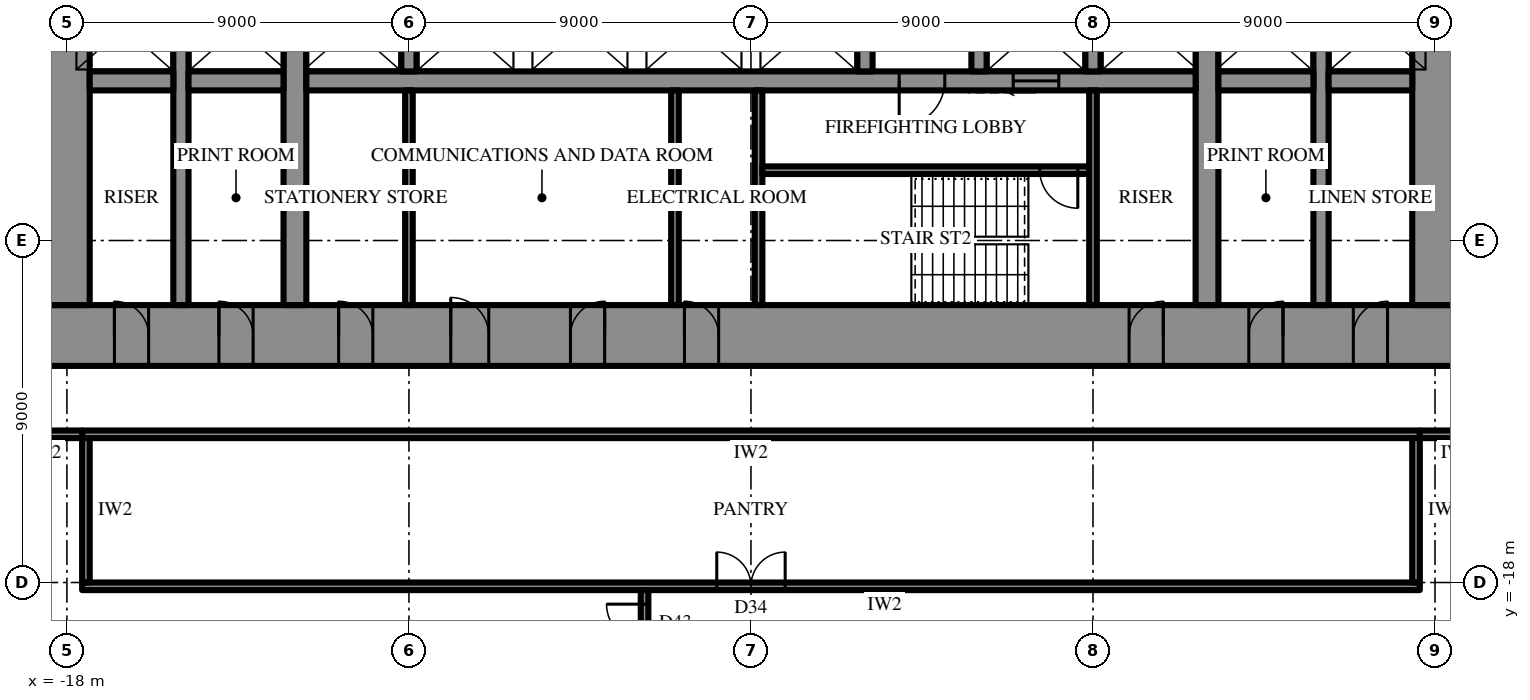
"""IFC4 building model, lengths in metres.
Left out: names, types, materials, properties, quantities, classifications, styles, units other than length and angle.
Written with IfcOpenShell. Run it as: python <this file> out.ifc"""

import sys

from ifc_helpers import new_model, si_unit, direction, frame, frame_2d, origin, place, context, subcontext, project, spatial, rectangle, extrude, element, fill, save


model = new_model("IFC4")
c1 = context("Model", 3, precision=1e-05, world=origin(), true_north=direction((0.0, 1.0)))
c2 = subcontext(c1, "Body", "Model", "MODEL_VIEW")
j1 = project(units=[si_unit("LENGTHUNIT", "METRE"), si_unit("PLANEANGLEUNIT", "RADIAN")], contexts=[c1])
p1 = place(None, origin())
s1 = spatial("IfcSite", under=j1, at=p1, CompositionType="ELEMENT")
p2 = place(p1, origin())
s2 = spatial("IfcBuilding", under=s1, at=p2, CompositionType="ELEMENT")
p3 = place(p2, frame((0.0, 0.0, 99.1)))
s3 = spatial("IfcBuildingStorey", under=s2, at=p3, CompositionType="ELEMENT", Elevation=99.1)
p4 = place(p3, frame((18.6, -11.5, 0.0), z_axis=(0.0, 0.0, 1.0), x_axis=(-1.0, 0.0, 0.0)))
e1 = element("IfcWall", 1, at=p4, inside=s3, PredefinedType="SHEAR", context=c2, shape_type="SweptSolid", body=[
    extrude(rectangle(XDim=37.2, YDim=1.6, at=frame_2d((18.6, 0.0))), origin(), (0.0, 0.0, 1.0), 4.2),
])
p5 = place(p4, frame((19.45, 0.0, 0.0)))
e2 = element("IfcOpeningElement", 2, at=p5, cuts=e1, PredefinedType="OPENING", context=c2, shape_type="SweptSolid", body=[
    extrude(rectangle(XDim=0.9, YDim=2.2, at=frame_2d((0.45, 1.1))), frame((0.0, 0.81, 0.0), z_axis=(0.0, -1.0, 0.0), x_axis=(1.0, 0.0, 0.0)), (0.0, 0.0, 1.0), 1.62),
])
p6 = place(p4, frame((22.45, 0.0, 0.0)))
e3 = element("IfcOpeningElement", 3, at=p6, cuts=e1, PredefinedType="OPENING", context=c2, shape_type="SweptSolid", body=[
    extrude(rectangle(XDim=0.9, YDim=2.2, at=frame_2d((0.45, 1.1))), frame((0.0, 0.81, 0.0), z_axis=(0.0, -1.0, 0.0), x_axis=(1.0, 0.0, 0.0)), (0.0, 0.0, 1.0), 1.62),
])
p7 = place(p4, frame((25.5, 0.0, 0.0)))
e4 = element("IfcOpeningElement", 4, at=p7, cuts=e1, PredefinedType="OPENING", context=c2, shape_type="SweptSolid", body=[
    extrude(rectangle(XDim=1.0, YDim=2.2, at=frame_2d((0.5, 1.1))), frame((0.0, 0.81, 0.0), z_axis=(0.0, -1.0, 0.0), x_axis=(1.0, 0.0, 0.0)), (0.0, 0.0, 1.0), 1.62),
])
p8 = place(p4, frame((1.85, 0.0, 0.0)))
e5 = element("IfcOpeningElement", 5, at=p8, cuts=e1, PredefinedType="OPENING", context=c2, shape_type="SweptSolid", body=[
    extrude(rectangle(XDim=0.9, YDim=2.2, at=frame_2d((0.45, 1.1))), frame((0.0, 0.81, 0.0), z_axis=(0.0, -1.0, 0.0), x_axis=(1.0, 0.0, 0.0)), (0.0, 0.0, 1.0), 1.62),
])
p9 = place(p4, frame((4.6, 0.0, 0.0)))
e6 = element("IfcOpeningElement", 6, at=p9, cuts=e1, PredefinedType="OPENING", context=c2, shape_type="SweptSolid", body=[
    extrude(rectangle(XDim=0.9, YDim=2.2, at=frame_2d((0.45, 1.1))), frame((0.0, 0.81, 0.0), z_axis=(0.0, -1.0, 0.0), x_axis=(1.0, 0.0, 0.0)), (0.0, 0.0, 1.0), 1.62),
])
p10 = place(p4, frame((7.75, 0.0, 0.0)))
e7 = element("IfcOpeningElement", 7, at=p10, cuts=e1, PredefinedType="OPENING", context=c2, shape_type="SweptSolid", body=[
    extrude(rectangle(XDim=0.9, YDim=2.2, at=frame_2d((0.45, 1.1))), frame((0.0, 0.81, 0.0), z_axis=(0.0, -1.0, 0.0), x_axis=(1.0, 0.0, 0.0)), (0.0, 0.0, 1.0), 1.62),
])
p11 = place(p4, frame((28.55, 0.0, 0.0)))
e8 = element("IfcOpeningElement", 8, at=p11, cuts=e1, PredefinedType="OPENING", context=c2, shape_type="SweptSolid", body=[
    extrude(rectangle(XDim=0.9, YDim=2.2, at=frame_2d((0.45, 1.1))), frame((0.0, 0.81, 0.0), z_axis=(0.0, -1.0, 0.0), x_axis=(1.0, 0.0, 0.0)), (0.0, 0.0, 1.0), 1.62),
])
p12 = place(p4, frame((31.7, 0.0, 0.0)))
e9 = element("IfcOpeningElement", 9, at=p12, cuts=e1, PredefinedType="OPENING", context=c2, shape_type="SweptSolid", body=[
    extrude(rectangle(XDim=0.9, YDim=2.2, at=frame_2d((0.45, 1.1))), frame((0.0, 0.81, 0.0), z_axis=(0.0, -1.0, 0.0), x_axis=(1.0, 0.0, 0.0)), (0.0, 0.0, 1.0), 1.62),
])
p13 = place(p4, frame((34.45, 0.0, 0.0)))
e10 = element("IfcOpeningElement", 10, at=p13, cuts=e1, PredefinedType="OPENING", context=c2, shape_type="SweptSolid", body=[
    extrude(rectangle(XDim=0.9, YDim=2.2, at=frame_2d((0.45, 1.1))), frame((0.0, 0.81, 0.0), z_axis=(0.0, -1.0, 0.0), x_axis=(1.0, 0.0, 0.0)), (0.0, 0.0, 1.0), 1.62),
])
p14 = place(p3, frame((18.0, -10.7, 0.0), z_axis=(0.0, 0.0, 1.0), x_axis=(0.0, 1.0, 0.0)))
e11 = element("IfcWall", 11, at=p14, inside=s3, PredefinedType="SHEAR", context=c2, shape_type="SweptSolid", body=[
    extrude(rectangle(XDim=21.4, YDim=1.2, at=frame_2d((10.7, 0.0))), origin(), (0.0, 0.0, 1.0), 4.2),
])
p15 = place(p14, frame((9.8, 0.0, 0.0)))
e12 = element("IfcOpeningElement", 12, at=p15, cuts=e11, PredefinedType="OPENING", context=c2, shape_type="SweptSolid", body=[
    extrude(rectangle(XDim=1.8, YDim=2.4, at=frame_2d((0.9, 1.2))), frame((0.0, 0.61, 0.0), z_axis=(0.0, -1.0, 0.0), x_axis=(1.0, 0.0, 0.0)), (0.0, 0.0, 1.0), 1.22),
])
p16 = place(p3, frame((-18.0, 10.7, 0.0), z_axis=(0.0, 0.0, 1.0), x_axis=(0.0, -1.0, 0.0)))
e13 = element("IfcWall", 13, at=p16, inside=s3, PredefinedType="SHEAR", context=c2, shape_type="SweptSolid", body=[
    extrude(rectangle(XDim=21.4, YDim=1.2, at=frame_2d((10.7, 0.0))), origin(), (0.0, 0.0, 1.0), 4.2),
])
p17 = place(p16, frame((9.8, 0.0, 0.0)))
e14 = element("IfcOpeningElement", 14, at=p17, cuts=e13, PredefinedType="OPENING", context=c2, shape_type="SweptSolid", body=[
    extrude(rectangle(XDim=1.8, YDim=2.4, at=frame_2d((0.9, 1.2))), frame((0.0, 0.61, 0.0), z_axis=(0.0, -1.0, 0.0), x_axis=(1.0, 0.0, 0.0)), (0.0, 0.0, 1.0), 1.22),
])
p18 = place(p3, frame((12.0, -10.7, 0.0), z_axis=(0.0, 0.0, 1.0), x_axis=(0.0, 1.0, 0.0)))
e15 = element("IfcWall", 15, at=p18, inside=s3, PredefinedType="SHEAR", context=c2, shape_type="SweptSolid", body=[
    extrude(rectangle(XDim=21.4, YDim=0.6, at=frame_2d((10.7, 0.0))), origin(), (0.0, 0.0, 1.0), 4.2),
])
p19 = place(p18, frame((9.8, 0.0, 0.0)))
e16 = element("IfcOpeningElement", 16, at=p19, cuts=e15, PredefinedType="OPENING", context=c2, shape_type="SweptSolid", body=[
    extrude(rectangle(XDim=1.8, YDim=2.4, at=frame_2d((0.9, 1.2))), frame((0.0, 0.31, 0.0), z_axis=(0.0, -1.0, 0.0), x_axis=(1.0, 0.0, 0.0)), (0.0, 0.0, 1.0), 0.62),
])
p20 = place(p3, frame((-12.0, -10.7, 0.0), z_axis=(0.0, 0.0, 1.0), x_axis=(0.0, 1.0, 0.0)))
e17 = element("IfcWall", 17, at=p20, inside=s3, PredefinedType="SHEAR", context=c2, shape_type="SweptSolid", body=[
    extrude(rectangle(XDim=21.4, YDim=0.6, at=frame_2d((10.7, 0.0))), origin(), (0.0, 0.0, 1.0), 4.2),
])
p21 = place(p20, frame((9.8, 0.0, 0.0)))
e18 = element("IfcOpeningElement", 18, at=p21, cuts=e17, PredefinedType="OPENING", context=c2, shape_type="SweptSolid", body=[
    extrude(rectangle(XDim=1.8, YDim=2.4, at=frame_2d((0.9, 1.2))), frame((0.0, 0.31, 0.0), z_axis=(0.0, -1.0, 0.0), x_axis=(1.0, 0.0, 0.0)), (0.0, 0.0, 1.0), 0.62),
])
p22 = place(p3, frame((15.0, -10.7, 0.0), z_axis=(0.0, 0.0, 1.0), x_axis=(0.0, 1.0, 0.0)))
e19 = element("IfcWall", 19, at=p22, inside=s3, PredefinedType="SHEAR", context=c2, shape_type="SweptSolid", body=[
    extrude(rectangle(XDim=21.4, YDim=0.4, at=frame_2d((10.7, 0.0))), origin(), (0.0, 0.0, 1.0), 4.2),
])
p23 = place(p22, frame((9.8, 0.0, 0.0)))
e20 = element("IfcOpeningElement", 20, at=p23, cuts=e19, PredefinedType="OPENING", context=c2, shape_type="SweptSolid", body=[
    extrude(rectangle(XDim=1.8, YDim=2.4, at=frame_2d((0.9, 1.2))), frame((0.0, 0.21, 0.0), z_axis=(0.0, -1.0, 0.0), x_axis=(1.0, 0.0, 0.0)), (0.0, 0.0, 1.0), 0.42),
])
p24 = place(p3, frame((-15.0, -10.7, 0.0), z_axis=(0.0, 0.0, 1.0), x_axis=(0.0, 1.0, 0.0)))
e21 = element("IfcWall", 21, at=p24, inside=s3, PredefinedType="SHEAR", context=c2, shape_type="SweptSolid", body=[
    extrude(rectangle(XDim=21.4, YDim=0.4, at=frame_2d((10.7, 0.0))), origin(), (0.0, 0.0, 1.0), 4.2),
])
p25 = place(p24, frame((9.8, 0.0, 0.0)))
e22 = element("IfcOpeningElement", 22, at=p25, cuts=e21, PredefinedType="OPENING", context=c2, shape_type="SweptSolid", body=[
    extrude(rectangle(XDim=1.8, YDim=2.4, at=frame_2d((0.9, 1.2))), frame((0.0, 0.21, 0.0), z_axis=(0.0, -1.0, 0.0), x_axis=(1.0, 0.0, 0.0)), (0.0, 0.0, 1.0), 0.42),
])
p26 = place(p3, frame((17.4, -4.8, 0.0), z_axis=(0.0, 0.0, 1.0), x_axis=(-1.0, 0.0, 0.0)))
e23 = element("IfcWall", 23, at=p26, inside=s3, PredefinedType="SHEAR", context=c2, shape_type="SweptSolid", body=[
    extrude(rectangle(XDim=2.2, YDim=0.5, at=frame_2d((1.1, 0.0))), origin(), (0.0, 0.0, 1.0), 4.2),
])
p27 = place(p3, frame((14.8, -4.8, 0.0), z_axis=(0.0, 0.0, 1.0), x_axis=(-1.0, 0.0, 0.0)))
e24 = element("IfcWall", 24, at=p27, inside=s3, PredefinedType="SHEAR", context=c2, shape_type="SweptSolid", body=[
    extrude(rectangle(XDim=2.5, YDim=0.5, at=frame_2d((1.25, 0.0))), origin(), (0.0, 0.0, 1.0), 4.2),
])
p28 = place(p3, frame((11.7, -4.8, 0.0), z_axis=(0.0, 0.0, 1.0), x_axis=(-1.0, 0.0, 0.0)))
e25 = element("IfcWall", 25, at=p28, inside=s3, PredefinedType="SHEAR", context=c2, shape_type="SweptSolid", body=[
    extrude(rectangle(XDim=23.4, YDim=0.5, at=frame_2d((11.7, 0.0))), origin(), (0.0, 0.0, 1.0), 4.2),
])
p29 = place(p28, frame((6.6, 0.0, 0.0)))
e26 = element("IfcOpeningElement", 26, at=p29, cuts=e25, PredefinedType="OPENING", context=c2, shape_type="SweptSolid", body=[
    extrude(rectangle(XDim=1.2, YDim=2.2, at=frame_2d((0.6, 1.1))), frame((0.0, 0.26, 0.0), z_axis=(0.0, -1.0, 0.0), x_axis=(1.0, 0.0, 0.0)), (0.0, 0.0, 1.0), 0.52),
])
p30 = place(p28, frame((3.6, 0.0, 0.0)))
e27 = element("IfcOpeningElement", 27, at=p30, cuts=e25, PredefinedType="OPENING", context=c2, shape_type="SweptSolid", body=[
    extrude(rectangle(XDim=1.2, YDim=2.2, at=frame_2d((0.6, 1.1))), frame((0.0, 0.26, 0.0), z_axis=(0.0, -1.0, 0.0), x_axis=(1.0, 0.0, 0.0)), (0.0, 0.0, 1.0), 0.52),
])
p31 = place(p3, frame((-12.3, -4.8, 0.0), z_axis=(0.0, 0.0, 1.0), x_axis=(-1.0, 0.0, 0.0)))
e28 = element("IfcWall", 28, at=p31, inside=s3, PredefinedType="SHEAR", context=c2, shape_type="SweptSolid", body=[
    extrude(rectangle(XDim=2.5, YDim=0.5, at=frame_2d((1.25, 0.0))), origin(), (0.0, 0.0, 1.0), 4.2),
])
p32 = place(p3, frame((-15.2, -4.8, 0.0), z_axis=(0.0, 0.0, 1.0), x_axis=(-1.0, 0.0, 0.0)))
e29 = element("IfcWall", 29, at=p32, inside=s3, PredefinedType="SHEAR", context=c2, shape_type="SweptSolid", body=[
    extrude(rectangle(XDim=2.2, YDim=0.5, at=frame_2d((1.1, 0.0))), origin(), (0.0, 0.0, 1.0), 4.2),
])
for number, where, z_axis, x_axis in (
    (30, (9.0, -2.25, 0.0), (0.0, 0.0, 1.0), (0.0, -1.0, 0.0)),
    (31, (6.0, -2.25, 0.0), (0.0, 0.0, 1.0), (0.0, -1.0, 0.0)),
    (32, (3.0, -2.25, 0.0), (0.0, 0.0, 1.0), (0.0, -1.0, 0.0)),
    (33, (-9.0, -2.25, 0.0), (0.0, 0.0, 1.0), (0.0, -1.0, 0.0)),
):
    element("IfcWall", number, at=place(p3, frame(where, z_axis=z_axis, x_axis=x_axis)), inside=s3, PredefinedType="SHEAR", context=c2, shape_type="SweptSolid", body=[
        extrude(rectangle(XDim=2.3, YDim=0.4, at=frame_2d((1.15, 0.0))), origin(), (0.0, 0.0, 1.0), 4.2),
    ])
p33 = place(p3, frame((0.2, -5.05, 0.0), z_axis=(0.0, 0.0, 1.0), x_axis=(0.0, -1.0, 0.0)))
e34 = element("IfcWall", 34, at=p33, inside=s3, PredefinedType="SHEAR", context=c2, shape_type="SweptSolid", body=[
    extrude(rectangle(XDim=5.65, YDim=0.2, at=frame_2d((2.825, 0.0))), origin(), (0.0, 0.0, 1.0), 4.2),
])
p34 = place(p3, frame((8.9, -7.15, 0.0), z_axis=(0.0, 0.0, 1.0), x_axis=(-1.0, 0.0, 0.0)))
e35 = element("IfcWall", 35, at=p34, inside=s3, PredefinedType="SHEAR", context=c2, shape_type="SweptSolid", body=[
    extrude(rectangle(XDim=8.6, YDim=0.2, at=frame_2d((4.3, 0.0))), origin(), (0.0, 0.0, 1.0), 4.2),
])
p35 = place(p34, frame((0.3, 0.0, 0.0)))
e36 = element("IfcOpeningElement", 36, at=p35, cuts=e35, PredefinedType="OPENING", context=c2, shape_type="SweptSolid", body=[
    extrude(rectangle(XDim=1.0, YDim=2.2, at=frame_2d((0.5, 1.1))), frame((0.0, 0.11, 0.0), z_axis=(0.0, -1.0, 0.0), x_axis=(1.0, 0.0, 0.0)), (0.0, 0.0, 1.0), 0.22),
])
for number, where, z_axis, x_axis in (
    (37, (9.0, -5.05, 0.0), (0.0, 0.0, 1.0), (0.0, -1.0, 0.0)),
    (38, (-9.0, -5.05, 0.0), (0.0, 0.0, 1.0), (0.0, -1.0, 0.0)),
    (39, (-2.0, -5.05, 0.0), (0.0, 0.0, 1.0), (0.0, -1.0, 0.0)),
):
    element("IfcWall", number, at=place(p3, frame(where, z_axis=z_axis, x_axis=x_axis)), inside=s3, PredefinedType="PARTITIONING", context=c2, shape_type="SweptSolid", body=[
        extrude(rectangle(XDim=5.65, YDim=0.2, at=frame_2d((2.825, 0.0))), origin(), (0.0, 0.0, 1.0), 4.0),
    ])
p36 = place(p3, frame((17.6, -14.1, 0.0), z_axis=(0.0, 0.0, 1.0), x_axis=(-1.0, 0.0, 0.0)))
e40 = element("IfcWall", 40, at=p36, inside=s3, PredefinedType="PARTITIONING", context=c2, shape_type="SweptSolid", body=[
    extrude(rectangle(XDim=35.2, YDim=0.2, at=frame_2d((17.6, 0.0))), origin(), (0.0, 0.0, 1.0), 4.0),
])
p37 = place(p3, frame((17.6, -18.1, 0.0), z_axis=(0.0, 0.0, 1.0), x_axis=(-1.0, 0.0, 0.0)))
e41 = element("IfcWall", 41, at=p37, inside=s3, PredefinedType="PARTITIONING", context=c2, shape_type="SweptSolid", body=[
    extrude(rectangle(XDim=35.2, YDim=0.2, at=frame_2d((17.6, 0.0))), origin(), (0.0, 0.0, 1.0), 4.0),
])
p38 = place(p37, frame((16.7, 0.0, 0.0)))
e42 = element("IfcOpeningElement", 42, at=p38, cuts=e41, PredefinedType="OPENING", context=c2, shape_type="SweptSolid", body=[
    extrude(rectangle(XDim=1.8, YDim=2.4, at=frame_2d((0.9, 1.2))), frame((0.0, 0.11, 0.0), z_axis=(0.0, -1.0, 0.0), x_axis=(1.0, 0.0, 0.0)), (0.0, 0.0, 1.0), 0.22),
])
for number, where, z_axis, x_axis in (
    (43, (17.5, -14.2, 0.0), (0.0, 0.0, 1.0), (0.0, -1.0, 0.0)),
    (44, (-17.5, -14.2, 0.0), (0.0, 0.0, 1.0), (0.0, -1.0, 0.0)),
):
    element("IfcWall", number, at=place(p3, frame(where, z_axis=z_axis, x_axis=x_axis)), inside=s3, PredefinedType="PARTITIONING", context=c2, shape_type="SweptSolid", body=[
        extrude(rectangle(XDim=3.8, YDim=0.2, at=frame_2d((1.9, 0.0))), origin(), (0.0, 0.0, 1.0), 4.0),
    ])
for number, where, z_axis, x_axis in (
    (45, (-17.6, -14.1, 0.0), (0.0, 0.0, 1.0), (-1.0, 0.0, 0.0)),
    (46, (19.6, -14.1, 0.0), (0.0, 0.0, 1.0), (-1.0, 0.0, 0.0)),
):
    element("IfcWall", number, at=place(p3, frame(where, z_axis=z_axis, x_axis=x_axis)), inside=s3, PredefinedType="PARTITIONING", context=c2, shape_type="SweptSolid", body=[
        extrude(rectangle(XDim=2.0, YDim=0.2, at=frame_2d((1.0, 0.0))), origin(), (0.0, 0.0, 1.0), 4.0),
    ])
p39 = place(p3, frame((-2.8, -18.2, 0.0), z_axis=(0.0, 0.0, 1.0), x_axis=(0.0, -1.0, 0.0)))
e47 = element("IfcWall", 47, at=p39, inside=s3, PredefinedType="PARTITIONING", context=c2, shape_type="SweptSolid", body=[
    extrude(rectangle(XDim=8.7, YDim=0.2, at=frame_2d((4.35, 0.0))), origin(), (0.0, 0.0, 1.0), 2.944),
])
p40 = place(p39, frame((0.37, 0.0, 0.0)))
e48 = element("IfcOpeningElement", 48, at=p40, cuts=e47, PredefinedType="OPENING", context=c2, shape_type="SweptSolid", body=[
    extrude(rectangle(XDim=1.0, YDim=2.2, at=frame_2d((0.5, 1.1))), frame((0.0, 0.11, 0.0), z_axis=(0.0, -1.0, 0.0), x_axis=(1.0, 0.0, 0.0)), (0.0, 0.0, 1.0), 0.22),
])
p41 = place(p29, origin())
e49 = element("IfcDoor", 49, at=p41, inside=s3, OperationType="SINGLE_SWING_LEFT", PredefinedType="DOOR", context=c2, shape_type="SweptSolid", body=[
    extrude(rectangle(XDim=1.2, YDim=2.2, at=frame_2d((0.6, 1.1))), frame((0.0, 0.025, 0.0), z_axis=(0.0, -1.0, 0.0), x_axis=(1.0, 0.0, 0.0)), (0.0, 0.0, 1.0), 0.05),
])
fill(e26, e49)
p42 = place(p35, origin())
e50 = element("IfcDoor", 50, at=p42, inside=s3, OperationType="SINGLE_SWING_RIGHT", PredefinedType="DOOR", context=c2, shape_type="SweptSolid", body=[
    extrude(rectangle(XDim=1.0, YDim=2.2, at=frame_2d((0.5, 1.1))), frame((0.0, 0.025, 0.0), z_axis=(0.0, -1.0, 0.0), x_axis=(1.0, 0.0, 0.0)), (0.0, 0.0, 1.0), 0.05),
])
fill(e36, e50)
p43 = place(p5, frame((0.9, 0.0, 0.0), z_axis=(0.0, 0.0, 1.0), x_axis=(-1.0, 0.0, 0.0)))
e51 = element("IfcDoor", 51, at=p43, inside=s3, OperationType="SINGLE_SWING_RIGHT", PredefinedType="DOOR", context=c2, shape_type="SweptSolid", body=[
    extrude(rectangle(XDim=0.9, YDim=2.2, at=frame_2d((0.45, 1.1))), frame((0.0, 0.025, 0.0), z_axis=(0.0, -1.0, 0.0), x_axis=(1.0, 0.0, 0.0)), (0.0, 0.0, 1.0), 0.05),
])
fill(e2, e51)
p44 = place(p6, frame((0.9, 0.0, 0.0), z_axis=(0.0, 0.0, 1.0), x_axis=(-1.0, 0.0, 0.0)))
e52 = element("IfcDoor", 52, at=p44, inside=s3, OperationType="SINGLE_SWING_LEFT", PredefinedType="DOOR", context=c2, shape_type="SweptSolid", body=[
    extrude(rectangle(XDim=0.9, YDim=2.2, at=frame_2d((0.45, 1.1))), frame((0.0, 0.025, 0.0), z_axis=(0.0, -1.0, 0.0), x_axis=(1.0, 0.0, 0.0)), (0.0, 0.0, 1.0), 0.05),
])
fill(e3, e52)
p45 = place(p7, frame((1.0, 0.0, 0.0), z_axis=(0.0, 0.0, 1.0), x_axis=(-1.0, 0.0, 0.0)))
e53 = element("IfcDoor", 53, at=p45, inside=s3, OperationType="SINGLE_SWING_RIGHT", PredefinedType="DOOR", context=c2, shape_type="SweptSolid", body=[
    extrude(rectangle(XDim=1.0, YDim=2.2, at=frame_2d((0.5, 1.1))), frame((0.0, 0.025, 0.0), z_axis=(0.0, -1.0, 0.0), x_axis=(1.0, 0.0, 0.0)), (0.0, 0.0, 1.0), 0.05),
])
fill(e4, e53)
p46 = place(p8, frame((0.9, 0.0, 0.0), z_axis=(0.0, 0.0, 1.0), x_axis=(-1.0, 0.0, 0.0)))
e54 = element("IfcDoor", 54, at=p46, inside=s3, OperationType="SINGLE_SWING_LEFT", PredefinedType="DOOR", context=c2, shape_type="SweptSolid", body=[
    extrude(rectangle(XDim=0.9, YDim=2.2, at=frame_2d((0.45, 1.1))), frame((0.0, 0.025, 0.0), z_axis=(0.0, -1.0, 0.0), x_axis=(1.0, 0.0, 0.0)), (0.0, 0.0, 1.0), 0.05),
])
fill(e5, e54)
p47 = place(p9, frame((0.9, 0.0, 0.0), z_axis=(0.0, 0.0, 1.0), x_axis=(-1.0, 0.0, 0.0)))
e55 = element("IfcDoor", 55, at=p47, inside=s3, OperationType="SINGLE_SWING_LEFT", PredefinedType="DOOR", context=c2, shape_type="SweptSolid", body=[
    extrude(rectangle(XDim=0.9, YDim=2.2, at=frame_2d((0.45, 1.1))), frame((0.0, 0.025, 0.0), z_axis=(0.0, -1.0, 0.0), x_axis=(1.0, 0.0, 0.0)), (0.0, 0.0, 1.0), 0.05),
])
fill(e6, e55)
p48 = place(p10, frame((0.9, 0.0, 0.0), z_axis=(0.0, 0.0, 1.0), x_axis=(-1.0, 0.0, 0.0)))
e56 = element("IfcDoor", 56, at=p48, inside=s3, OperationType="SINGLE_SWING_LEFT", PredefinedType="DOOR", context=c2, shape_type="SweptSolid", body=[
    extrude(rectangle(XDim=0.9, YDim=2.2, at=frame_2d((0.45, 1.1))), frame((0.0, 0.025, 0.0), z_axis=(0.0, -1.0, 0.0), x_axis=(1.0, 0.0, 0.0)), (0.0, 0.0, 1.0), 0.05),
])
fill(e7, e56)
p49 = place(p11, frame((0.9, 0.0, 0.0), z_axis=(0.0, 0.0, 1.0), x_axis=(-1.0, 0.0, 0.0)))
e57 = element("IfcDoor", 57, at=p49, inside=s3, OperationType="SINGLE_SWING_RIGHT", PredefinedType="DOOR", context=c2, shape_type="SweptSolid", body=[
    extrude(rectangle(XDim=0.9, YDim=2.2, at=frame_2d((0.45, 1.1))), frame((0.0, 0.025, 0.0), z_axis=(0.0, -1.0, 0.0), x_axis=(1.0, 0.0, 0.0)), (0.0, 0.0, 1.0), 0.05),
])
fill(e8, e57)
p50 = place(p12, frame((0.9, 0.0, 0.0), z_axis=(0.0, 0.0, 1.0), x_axis=(-1.0, 0.0, 0.0)))
e58 = element("IfcDoor", 58, at=p50, inside=s3, OperationType="SINGLE_SWING_RIGHT", PredefinedType="DOOR", context=c2, shape_type="SweptSolid", body=[
    extrude(rectangle(XDim=0.9, YDim=2.2, at=frame_2d((0.45, 1.1))), frame((0.0, 0.025, 0.0), z_axis=(0.0, -1.0, 0.0), x_axis=(1.0, 0.0, 0.0)), (0.0, 0.0, 1.0), 0.05),
])
fill(e9, e58)
p51 = place(p13, frame((0.9, 0.0, 0.0), z_axis=(0.0, 0.0, 1.0), x_axis=(-1.0, 0.0, 0.0)))
e59 = element("IfcDoor", 59, at=p51, inside=s3, OperationType="SINGLE_SWING_RIGHT", PredefinedType="DOOR", context=c2, shape_type="SweptSolid", body=[
    extrude(rectangle(XDim=0.9, YDim=2.2, at=frame_2d((0.45, 1.1))), frame((0.0, 0.025, 0.0), z_axis=(0.0, -1.0, 0.0), x_axis=(1.0, 0.0, 0.0)), (0.0, 0.0, 1.0), 0.05),
])
fill(e10, e59)
p52 = place(p30, origin())
e60 = element("IfcDoor", 60, at=p52, inside=s3, OperationType="SLIDING_TO_LEFT", PredefinedType="DOOR", context=c2, shape_type="SweptSolid", body=[
    extrude(rectangle(XDim=1.2, YDim=2.2, at=frame_2d((0.6, 1.1))), frame((0.0, 0.025, 0.0), z_axis=(0.0, -1.0, 0.0), x_axis=(1.0, 0.0, 0.0)), (0.0, 0.0, 1.0), 0.05),
])
fill(e27, e60)
p53 = place(p38, frame((1.8, 0.0, 0.0), z_axis=(0.0, 0.0, 1.0), x_axis=(-1.0, 0.0, 0.0)))
e61 = element("IfcDoor", 61, at=p53, inside=s3, OperationType="DOUBLE_DOOR_SINGLE_SWING", PredefinedType="DOOR", context=c2, shape_type="SweptSolid", body=[
    extrude(rectangle(XDim=1.8, YDim=2.4, at=frame_2d((0.9, 1.2))), frame((0.0, 0.025, 0.0), z_axis=(0.0, -1.0, 0.0), x_axis=(1.0, 0.0, 0.0)), (0.0, 0.0, 1.0), 0.05),
])
fill(e42, e61)
p54 = place(p40, frame((1.0, 0.0, 0.0), z_axis=(0.0, 0.0, 1.0), x_axis=(-1.0, 0.0, 0.0)))
e62 = element("IfcDoor", 62, at=p54, inside=s3, OperationType="SINGLE_SWING_LEFT", PredefinedType="DOOR", context=c2, shape_type="SweptSolid", body=[
    extrude(rectangle(XDim=1.0, YDim=2.2, at=frame_2d((0.5, 1.1))), frame((0.0, 0.025, 0.0), z_axis=(0.0, -1.0, 0.0), x_axis=(1.0, 0.0, 0.0)), (0.0, 0.0, 1.0), 0.05),
])
fill(e48, e62)
save(model, sys.argv[1])
